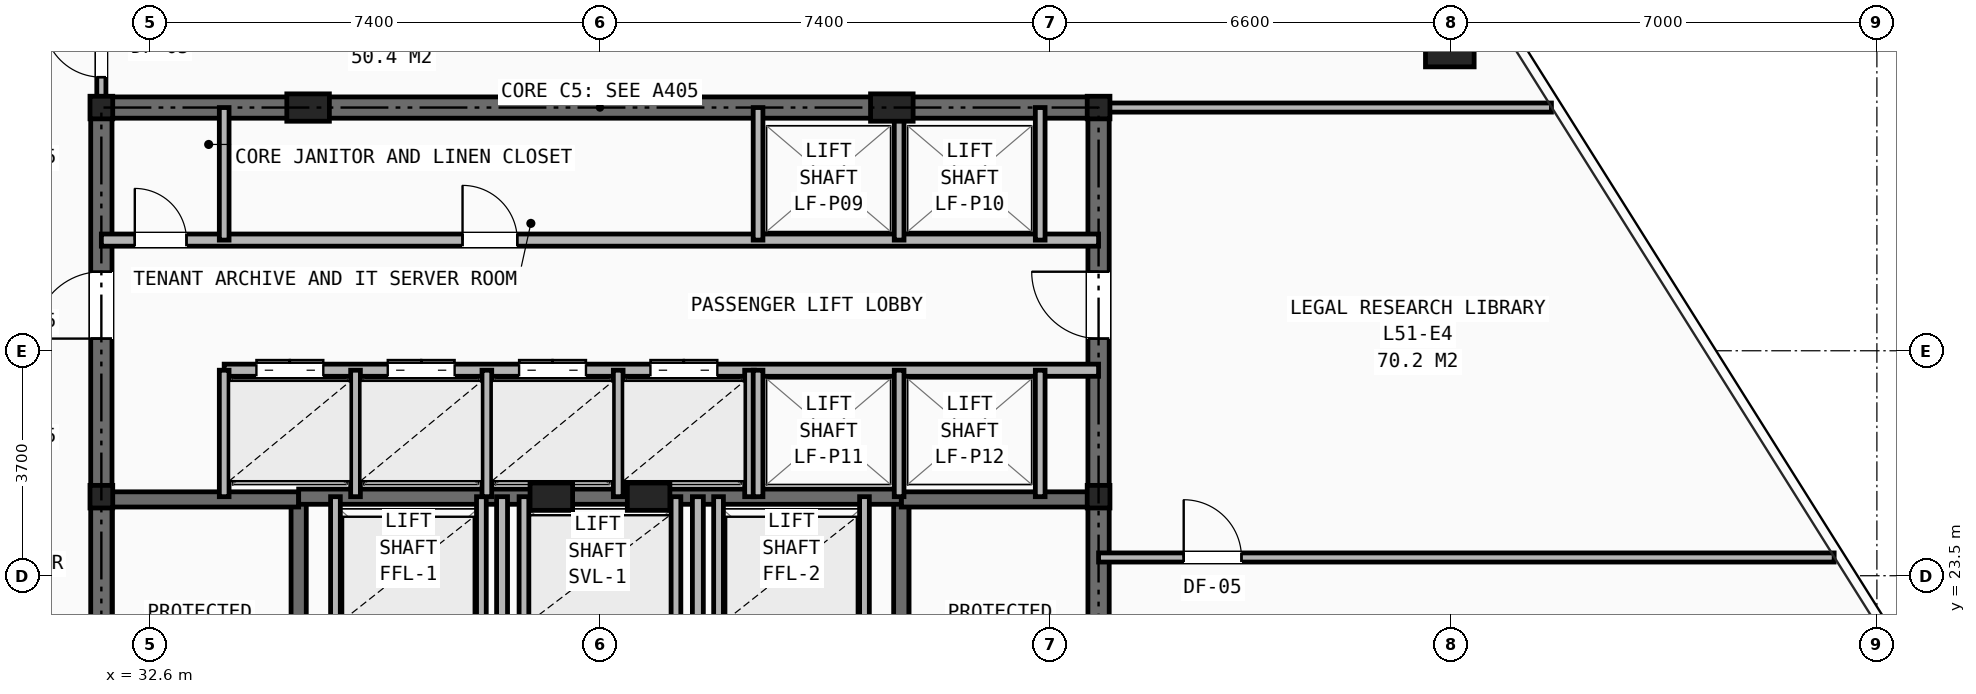
"""IFC4 building model, lengths in metres.
Left out: names, types, materials, properties, quantities, classifications, styles, units other than length and angle.
Written with IfcOpenShell. Run it as: python <this file> out.ifc"""

import sys

from ifc_helpers import new_model, si_unit, direction, frame, frame_2d, origin, origin_2d, place, context, subcontext, project, spatial, rectangle, hollow_rectangle, i_section, extrude, element, fill, save


model = new_model("IFC4")
c1 = context("Model", 3, precision=1e-05, world=origin(), true_north=direction((0.0, 1.0)))
c2 = subcontext(c1, "Body", "Model", "MODEL_VIEW")
j1 = project(units=[si_unit("LENGTHUNIT", "METRE"), si_unit("PLANEANGLEUNIT", "RADIAN")], contexts=[c1])
p1 = place(None, origin())
s1 = spatial("IfcSite", under=j1, at=p1, CompositionType="ELEMENT")
p2 = place(p1, origin())
s2 = spatial("IfcBuilding", under=s1, at=p2, CompositionType="ELEMENT")
p3 = place(p2, frame((0.0, 0.0, 179.25)))
s3 = spatial("IfcBuildingStorey", under=s2, at=p3, CompositionType="ELEMENT", Elevation=179.25)
for number, where, z_axis, x_axis in (
    (1, (31.8, 24.8, 0.0), (0.0, 0.0, 1.0), (1.0, 0.0, 0.0)),
    (2, (48.2, 24.8, 0.0), (0.0, 0.0, 1.0), (1.0, 0.0, 0.0)),
    (3, (31.8, 31.2, 0.0), (0.0, 0.0, 1.0), (1.0, 0.0, 0.0)),
    (4, (48.2, 31.2, 0.0), (0.0, 0.0, 1.0), (1.0, 0.0, 0.0)),
):
    element("IfcColumn", number, at=place(p3, frame(where, z_axis=z_axis, x_axis=x_axis)), inside=s3, PredefinedType="COLUMN", context=c2, shape_type="SweptSolid", body=[
        extrude(i_section(OverallWidth=0.374, OverallDepth=0.372, WebThickness=0.016, FlangeThickness=0.026, at=origin_2d()), origin(), (0.0, 0.0, 1.0), 3.45),
    ])
for number, where, z_axis, x_axis in (
    (5, (35.2, 31.2, 0.0), (0.0, 0.0, 1.0), (1.0, 0.0, 0.0)),
    (6, (44.8, 31.2, 0.0), (0.0, 0.0, 1.0), (1.0, 0.0, 0.0)),
    (7, (39.2, 24.8, 0.0), (0.0, 0.0, 1.0), (1.0, 0.0, 0.0)),
    (8, (40.8, 24.8, 0.0), (0.0, 0.0, 1.0), (1.0, 0.0, 0.0)),
):
    element("IfcColumn", number, at=place(p3, frame(where, z_axis=z_axis, x_axis=x_axis)), inside=s3, PredefinedType="PILASTER", context=c2, shape_type="SweptSolid", body=[
        extrude(rectangle(XDim=0.7, YDim=0.45, at=origin_2d()), origin(), (0.0, 0.0, 1.0), 3.45),
    ])
p4 = place(p3, frame((53.976, 32.269, 0.0), z_axis=(0.0, 0.0, 1.0), x_axis=(1.0, 0.0, 0.0)))
e9 = element("IfcColumn", 9, at=p4, inside=s3, PredefinedType="COLUMN", context=c2, shape_type="SweptSolid", body=[
    extrude(hollow_rectangle(XDim=0.8, YDim=0.8, WallThickness=0.055, at=origin_2d()), origin(), (0.0, 0.0, 1.0), 3.45),
])
p5 = place(p3, frame((31.8, 31.2, 0.0), z_axis=(0.0, 0.0, 1.0), x_axis=(1.0, 0.0, 0.0)))
e10 = element("IfcWall", 10, at=p5, inside=s3, PredefinedType="SHEAR", context=c2, shape_type="SweptSolid", body=[
    extrude(rectangle(XDim=16.4, YDim=0.35, at=frame_2d((8.2, 0.0))), origin(), (0.0, 0.0, 1.0), 3.21),
])
p6 = place(p3, frame((31.8, 16.4, 0.0), z_axis=(0.0, 0.0, 1.0), x_axis=(0.0, 1.0, 0.0)))
e11 = element("IfcWall", 11, at=p6, inside=s3, PredefinedType="SHEAR", context=c2, shape_type="SweptSolid", body=[
    extrude(rectangle(XDim=14.8, YDim=0.35, at=frame_2d((7.4, 0.0))), origin(), (0.0, 0.0, 1.0), 3.21),
])
p7 = place(p6, frame((11.0, 0.0, 0.0)))
e12 = element("IfcOpeningElement", 12, at=p7, cuts=e11, PredefinedType="OPENING", context=c2, shape_type="SweptSolid", body=[
    extrude(rectangle(XDim=1.1, YDim=2.15, at=frame_2d((0.55, 1.075))), frame((0.0, 0.185, 0.0), z_axis=(0.0, -1.0, 0.0), x_axis=(1.0, 0.0, 0.0)), (0.0, 0.0, 1.0), 0.37),
])
p8 = place(p3, frame((48.2, 16.4, 0.0), z_axis=(0.0, 0.0, 1.0), x_axis=(0.0, 1.0, 0.0)))
e13 = element("IfcWall", 13, at=p8, inside=s3, PredefinedType="SHEAR", context=c2, shape_type="SweptSolid", body=[
    extrude(rectangle(XDim=14.8, YDim=0.35, at=frame_2d((7.4, 0.0))), origin(), (0.0, 0.0, 1.0), 3.21),
])
p9 = place(p8, frame((11.0, 0.0, 0.0)))
e14 = element("IfcOpeningElement", 14, at=p9, cuts=e13, PredefinedType="OPENING", context=c2, shape_type="SweptSolid", body=[
    extrude(rectangle(XDim=1.1, YDim=2.15, at=frame_2d((0.55, 1.075))), frame((0.0, 0.185, 0.0), z_axis=(0.0, -1.0, 0.0), x_axis=(1.0, 0.0, 0.0)), (0.0, 0.0, 1.0), 0.37),
])
p10 = place(p3, frame((35.045, 16.4, 0.0), z_axis=(0.0, 0.0, 1.0), x_axis=(0.0, 1.0, 0.0)))
e15 = element("IfcWall", 15, at=p10, inside=s3, PredefinedType="SHEAR", context=c2, shape_type="SweptSolid", body=[
    extrude(rectangle(XDim=8.4, YDim=0.25, at=frame_2d((4.2, 0.0))), origin(), (0.0, 0.0, 1.0), 3.21),
])
p11 = place(p10, frame((0.45, 0.0, 0.0)))
e16 = element("IfcOpeningElement", 16, at=p11, cuts=e15, PredefinedType="OPENING", context=c2, shape_type="SweptSolid", body=[
    extrude(rectangle(XDim=0.95, YDim=2.1, at=frame_2d((0.475, 1.05))), frame((0.0, 0.135, 0.0), z_axis=(0.0, -1.0, 0.0), x_axis=(1.0, 0.0, 0.0)), (0.0, 0.0, 1.0), 0.27),
])
p12 = place(p3, frame((31.8, 24.755, 0.0), z_axis=(0.0, 0.0, 1.0), x_axis=(1.0, 0.0, 0.0)))
e17 = element("IfcWall", 17, at=p12, inside=s3, PredefinedType="SHEAR", context=c2, shape_type="SweptSolid", body=[
    extrude(rectangle(XDim=3.245, YDim=0.25, at=frame_2d((1.623, 0.0))), origin(), (0.0, 0.0, 1.0), 3.21),
])
p13 = place(p3, frame((44.955, 16.4, 0.0), z_axis=(0.0, 0.0, 1.0), x_axis=(0.0, 1.0, 0.0)))
e18 = element("IfcWall", 18, at=p13, inside=s3, PredefinedType="SHEAR", context=c2, shape_type="SweptSolid", body=[
    extrude(rectangle(XDim=8.4, YDim=0.25, at=frame_2d((4.2, 0.0))), origin(), (0.0, 0.0, 1.0), 3.21),
])
p14 = place(p13, frame((0.45, 0.0, 0.0)))
e19 = element("IfcOpeningElement", 19, at=p14, cuts=e18, PredefinedType="OPENING", context=c2, shape_type="SweptSolid", body=[
    extrude(rectangle(XDim=0.95, YDim=2.1, at=frame_2d((0.475, 1.05))), frame((0.0, 0.135, 0.0), z_axis=(0.0, -1.0, 0.0), x_axis=(1.0, 0.0, 0.0)), (0.0, 0.0, 1.0), 0.27),
])
p15 = place(p3, frame((44.955, 24.755, 0.0), z_axis=(0.0, 0.0, 1.0), x_axis=(1.0, 0.0, 0.0)))
e20 = element("IfcWall", 20, at=p15, inside=s3, PredefinedType="SHEAR", context=c2, shape_type="SweptSolid", body=[
    extrude(rectangle(XDim=3.245, YDim=0.25, at=frame_2d((1.623, 0.0))), origin(), (0.0, 0.0, 1.0), 3.21),
])
p16 = place(p3, frame((35.045, 24.8, 0.0), z_axis=(0.0, 0.0, 1.0), x_axis=(1.0, 0.0, 0.0)))
e21 = element("IfcWall", 21, at=p16, inside=s3, PredefinedType="SHEAR", context=c2, shape_type="SweptSolid", body=[
    extrude(rectangle(XDim=9.91, YDim=0.25, at=frame_2d((4.955, 0.0))), origin(), (0.0, 0.0, 1.0), 3.21),
])
p17 = place(p3, frame((38.39, 16.4, 0.0), z_axis=(0.0, 0.0, 1.0), x_axis=(0.0, 1.0, 0.0)))
e22 = element("IfcWall", 22, at=p17, inside=s3, PredefinedType="PARTITIONING", context=c2, shape_type="SweptSolid", body=[
    extrude(rectangle(XDim=8.4, YDim=0.18, at=frame_2d((4.2, 0.0))), origin(), (0.0, 0.0, 1.0), 2.665),
])
p18 = place(p17, frame((3.8, 0.0, 0.0)))
e23 = element("IfcOpeningElement", 23, at=p18, cuts=e22, PredefinedType="OPENING", context=c2, shape_type="SweptSolid", body=[
    extrude(rectangle(XDim=0.95, YDim=2.1, at=frame_2d((0.475, 1.05))), frame((0.0, 0.1, 0.0), z_axis=(0.0, -1.0, 0.0), x_axis=(1.0, 0.0, 0.0)), (0.0, 0.0, 1.0), 0.2),
])
p19 = place(p3, frame((41.61, 16.4, 0.0), z_axis=(0.0, 0.0, 1.0), x_axis=(0.0, 1.0, 0.0)))
e24 = element("IfcWall", 24, at=p19, inside=s3, PredefinedType="PARTITIONING", context=c2, shape_type="SweptSolid", body=[
    extrude(rectangle(XDim=8.4, YDim=0.18, at=frame_2d((4.2, 0.0))), origin(), (0.0, 0.0, 1.0), 2.665),
])
for number, where, z_axis, x_axis in (
    (25, (35.65, 22.48, 0.0), (0.0, 0.0, 1.0), (0.0, 1.0, 0.0)),
    (26, (38.05, 22.48, 0.0), (0.0, 0.0, 1.0), (0.0, 1.0, 0.0)),
    (27, (41.95, 22.48, 0.0), (0.0, 0.0, 1.0), (0.0, 1.0, 0.0)),
    (28, (44.35, 22.48, 0.0), (0.0, 0.0, 1.0), (0.0, 1.0, 0.0)),
    (29, (38.75, 22.48, 0.0), (0.0, 0.0, 1.0), (0.0, 1.0, 0.0)),
    (30, (41.25, 22.48, 0.0), (0.0, 0.0, 1.0), (0.0, 1.0, 0.0)),
):
    element("IfcWall", number, at=place(p3, frame(where, z_axis=z_axis, x_axis=x_axis)), inside=s3, PredefinedType="SOLIDWALL", context=c2, shape_type="SweptSolid", body=[
        extrude(rectangle(XDim=2.32, YDim=0.16, at=frame_2d((1.16, 0.0))), origin(), (0.0, 0.0, 1.0), 3.21),
    ])
p20 = place(p3, frame((31.8, 29.02, 0.0), z_axis=(0.0, 0.0, 1.0), x_axis=(1.0, 0.0, 0.0)))
e31 = element("IfcWall", 31, at=p20, inside=s3, PredefinedType="SOLIDWALL", context=c2, shape_type="SweptSolid", body=[
    extrude(rectangle(XDim=16.4, YDim=0.2, at=frame_2d((8.2, 0.0))), origin(), (0.0, 0.0, 1.0), 2.665),
])
p21 = place(p20, frame((0.55, 0.0, 0.0)))
e32 = element("IfcOpeningElement", 32, at=p21, cuts=e31, PredefinedType="OPENING", context=c2, shape_type="SweptSolid", body=[
    extrude(rectangle(XDim=0.85, YDim=2.05, at=frame_2d((0.425, 1.025))), frame((0.0, 0.11, 0.0), z_axis=(0.0, -1.0, 0.0), x_axis=(1.0, 0.0, 0.0)), (0.0, 0.0, 1.0), 0.22),
])
p22 = place(p20, frame((5.94, 0.0, 0.0)))
e33 = element("IfcOpeningElement", 33, at=p22, cuts=e31, PredefinedType="OPENING", context=c2, shape_type="SweptSolid", body=[
    extrude(rectangle(XDim=0.9, YDim=2.1, at=frame_2d((0.45, 1.05))), frame((0.0, 0.11, 0.0), z_axis=(0.0, -1.0, 0.0), x_axis=(1.0, 0.0, 0.0)), (0.0, 0.0, 1.0), 0.22),
])
p23 = place(p3, frame((33.82, 26.88, 0.0), z_axis=(0.0, 0.0, 1.0), x_axis=(1.0, 0.0, 0.0)))
e34 = element("IfcWall", 34, at=p23, inside=s3, PredefinedType="SOLIDWALL", context=c2, shape_type="SweptSolid", body=[
    extrude(rectangle(XDim=14.38, YDim=0.2, at=frame_2d((7.19, 0.0))), origin(), (0.0, 0.0, 1.0), 2.665),
])
p24 = place(p23, frame((0.53, 0.0, 0.0)))
e35 = element("IfcOpeningElement", 35, at=p24, cuts=e34, PredefinedType="OPENING", context=c2, shape_type="SweptSolid", body=[
    extrude(rectangle(XDim=1.1, YDim=2.15, at=frame_2d((0.55, 1.075))), frame((0.0, 0.11, 0.0), z_axis=(0.0, -1.0, 0.0), x_axis=(1.0, 0.0, 0.0)), (0.0, 0.0, 1.0), 0.22),
])
p25 = place(p23, frame((2.69, 0.0, 0.0)))
e36 = element("IfcOpeningElement", 36, at=p25, cuts=e34, PredefinedType="OPENING", context=c2, shape_type="SweptSolid", body=[
    extrude(rectangle(XDim=1.1, YDim=2.15, at=frame_2d((0.55, 1.075))), frame((0.0, 0.11, 0.0), z_axis=(0.0, -1.0, 0.0), x_axis=(1.0, 0.0, 0.0)), (0.0, 0.0, 1.0), 0.22),
])
p26 = place(p23, frame((4.85, 0.0, 0.0)))
e37 = element("IfcOpeningElement", 37, at=p26, cuts=e34, PredefinedType="OPENING", context=c2, shape_type="SweptSolid", body=[
    extrude(rectangle(XDim=1.1, YDim=2.15, at=frame_2d((0.55, 1.075))), frame((0.0, 0.11, 0.0), z_axis=(0.0, -1.0, 0.0), x_axis=(1.0, 0.0, 0.0)), (0.0, 0.0, 1.0), 0.22),
])
p27 = place(p23, frame((7.01, 0.0, 0.0)))
e38 = element("IfcOpeningElement", 38, at=p27, cuts=e34, PredefinedType="OPENING", context=c2, shape_type="SweptSolid", body=[
    extrude(rectangle(XDim=1.1, YDim=2.15, at=frame_2d((0.55, 1.075))), frame((0.0, 0.11, 0.0), z_axis=(0.0, -1.0, 0.0), x_axis=(1.0, 0.0, 0.0)), (0.0, 0.0, 1.0), 0.22),
])
p28 = place(p3, frame((33.82, 29.02, 0.0), z_axis=(0.0, 0.0, 1.0), x_axis=(0.0, 1.0, 0.0)))
e39 = element("IfcWall", 39, at=p28, inside=s3, PredefinedType="SOLIDWALL", context=c2, shape_type="SweptSolid", body=[
    extrude(rectangle(XDim=2.18, YDim=0.16, at=frame_2d((1.09, 0.0))), origin(), (0.0, 0.0, 1.0), 2.665),
])
for number, where, z_axis, x_axis in (
    (40, (33.82, 24.8, 0.0), (0.0, 0.0, 1.0), (0.0, 1.0, 0.0)),
    (41, (35.98, 24.8, 0.0), (0.0, 0.0, 1.0), (0.0, 1.0, 0.0)),
    (42, (38.14, 24.8, 0.0), (0.0, 0.0, 1.0), (0.0, 1.0, 0.0)),
    (43, (40.3, 24.8, 0.0), (0.0, 0.0, 1.0), (0.0, 1.0, 0.0)),
    (44, (42.46, 24.8, 0.0), (0.0, 0.0, 1.0), (0.0, 1.0, 0.0)),
):
    element("IfcWall", number, at=place(p3, frame(where, z_axis=z_axis, x_axis=x_axis)), inside=s3, PredefinedType="SOLIDWALL", context=c2, shape_type="SweptSolid", body=[
        extrude(rectangle(XDim=2.08, YDim=0.16, at=frame_2d((1.04, 0.0))), origin(), (0.0, 0.0, 1.0), 3.21),
    ])
for number, where, z_axis, x_axis in (
    (45, (42.6, 29.02, 0.0), (0.0, 0.0, 1.0), (0.0, 1.0, 0.0)),
    (46, (44.92, 29.02, 0.0), (0.0, 0.0, 1.0), (0.0, 1.0, 0.0)),
    (47, (47.24, 29.02, 0.0), (0.0, 0.0, 1.0), (0.0, 1.0, 0.0)),
):
    element("IfcWall", number, at=place(p3, frame(where, z_axis=z_axis, x_axis=x_axis)), inside=s3, PredefinedType="SOLIDWALL", context=c2, shape_type="SweptSolid", body=[
        extrude(rectangle(XDim=2.18, YDim=0.16, at=frame_2d((1.09, 0.0))), origin(), (0.0, 0.0, 1.0), 2.665),
    ])
for number, where, z_axis, x_axis in (
    (48, (42.6, 24.8, 0.0), (0.0, 0.0, 1.0), (0.0, 1.0, 0.0)),
    (49, (44.92, 24.8, 0.0), (0.0, 0.0, 1.0), (0.0, 1.0, 0.0)),
    (50, (47.24, 24.8, 0.0), (0.0, 0.0, 1.0), (0.0, 1.0, 0.0)),
):
    element("IfcWall", number, at=place(p3, frame(where, z_axis=z_axis, x_axis=x_axis)), inside=s3, PredefinedType="SOLIDWALL", context=c2, shape_type="SweptSolid", body=[
        extrude(rectangle(XDim=2.08, YDim=0.16, at=frame_2d((1.04, 0.0))), origin(), (0.0, 0.0, 1.0), 3.21),
    ])
p29 = place(p3, frame((31.8, 31.2, 0.0), z_axis=(0.0, 0.0, 1.0), x_axis=(0.0, 1.0, 0.0)))
e51 = element("IfcWall", 51, at=p29, inside=s3, PredefinedType="PARTITIONING", context=c2, shape_type="SweptSolid", body=[
    extrude(rectangle(XDim=5.3, YDim=0.15, at=frame_2d((2.65, 0.0))), origin(), (0.0, 0.0, 1.0), 2.225),
])
p30 = place(p29, frame((0.5, 0.0, 0.0)))
e52 = element("IfcOpeningElement", 52, at=p30, cuts=e51, PredefinedType="OPENING", context=c2, shape_type="SweptSolid", body=[
    extrude(rectangle(XDim=0.95, YDim=2.1, at=frame_2d((0.475, 1.05))), frame((0.0, 0.085, 0.0), z_axis=(0.0, -1.0, 0.0), x_axis=(1.0, 0.0, 0.0)), (0.0, 0.0, 1.0), 0.17),
])
p31 = place(p29, frame((2.9, 0.0, 0.0)))
e53 = element("IfcOpeningElement", 53, at=p31, cuts=e51, PredefinedType="OPENING", context=c2, shape_type="SweptSolid", body=[
    extrude(rectangle(XDim=0.95, YDim=2.1, at=frame_2d((0.475, 1.05))), frame((0.0, 0.085, 0.0), z_axis=(0.0, -1.0, 0.0), x_axis=(1.0, 0.0, 0.0)), (0.0, 0.0, 1.0), 0.17),
])
p32 = place(p3, frame((48.2, 31.2, 0.0), z_axis=(0.0, 0.0, 1.0), x_axis=(1.0, 0.0, 0.0)))
e54 = element("IfcWall", 54, at=p32, inside=s3, PredefinedType="PARTITIONING", context=c2, shape_type="SweptSolid", body=[
    extrude(rectangle(XDim=7.448, YDim=0.15, at=frame_2d((3.724, 0.0))), origin(), (0.0, 0.0, 1.0), 2.225),
])
p33 = place(p3, frame((48.2, 23.8, 0.0), z_axis=(0.0, 0.0, 1.0), x_axis=(1.0, 0.0, 0.0)))
e55 = element("IfcWall", 55, at=p33, inside=s3, PredefinedType="PARTITIONING", context=c2, shape_type="SweptSolid", body=[
    extrude(rectangle(XDim=12.097, YDim=0.15, at=frame_2d((6.049, 0.0))), origin(), (0.0, 0.0, 1.0), 2.589),
])
p34 = place(p33, frame((1.4, 0.0, 0.0)))
e56 = element("IfcOpeningElement", 56, at=p34, cuts=e55, PredefinedType="OPENING", context=c2, shape_type="SweptSolid", body=[
    extrude(rectangle(XDim=0.95, YDim=2.1, at=frame_2d((0.475, 1.05))), frame((0.0, 0.085, 0.0), z_axis=(0.0, -1.0, 0.0), x_axis=(1.0, 0.0, 0.0)), (0.0, 0.0, 1.0), 0.17),
])
p35 = place(p21, origin())
e57 = element("IfcDoor", 57, at=p35, inside=s3, OperationType="SINGLE_SWING_LEFT", PredefinedType="DOOR", context=c2, shape_type="SweptSolid", body=[
    extrude(rectangle(XDim=0.85, YDim=2.05, at=frame_2d((0.425, 1.025))), frame((0.0, 0.025, 0.0), z_axis=(0.0, -1.0, 0.0), x_axis=(1.0, 0.0, 0.0)), (0.0, 0.0, 1.0), 0.05),
])
fill(e32, e57)
p36 = place(p7, origin())
e58 = element("IfcDoor", 58, at=p36, inside=s3, OperationType="SINGLE_SWING_LEFT", PredefinedType="DOOR", context=c2, shape_type="SweptSolid", body=[
    extrude(rectangle(XDim=1.1, YDim=2.15, at=frame_2d((0.55, 1.075))), frame((0.0, 0.025, 0.0), z_axis=(0.0, -1.0, 0.0), x_axis=(1.0, 0.0, 0.0)), (0.0, 0.0, 1.0), 0.05),
])
fill(e12, e58)
p37 = place(p9, origin())
e59 = element("IfcDoor", 59, at=p37, inside=s3, OperationType="SINGLE_SWING_RIGHT", PredefinedType="DOOR", context=c2, shape_type="SweptSolid", body=[
    extrude(rectangle(XDim=1.1, YDim=2.15, at=frame_2d((0.55, 1.075))), frame((0.0, 0.025, 0.0), z_axis=(0.0, -1.0, 0.0), x_axis=(1.0, 0.0, 0.0)), (0.0, 0.0, 1.0), 0.05),
])
fill(e14, e59)
p38 = place(p22, origin())
e60 = element("IfcDoor", 60, at=p38, inside=s3, OperationType="SINGLE_SWING_LEFT", PredefinedType="DOOR", context=c2, shape_type="SweptSolid", body=[
    extrude(rectangle(XDim=0.9, YDim=2.1, at=frame_2d((0.45, 1.05))), frame((0.0, 0.025, 0.0), z_axis=(0.0, -1.0, 0.0), x_axis=(1.0, 0.0, 0.0)), (0.0, 0.0, 1.0), 0.05),
])
fill(e33, e60)
p39 = place(p24, origin())
e61 = element("IfcDoor", 61, at=p39, inside=s3, OperationType="DOUBLE_DOOR_SLIDING", PredefinedType="DOOR", context=c2, shape_type="SweptSolid", body=[
    extrude(rectangle(XDim=1.1, YDim=2.15, at=frame_2d((0.55, 1.075))), frame((0.0, 0.025, 0.0), z_axis=(0.0, -1.0, 0.0), x_axis=(1.0, 0.0, 0.0)), (0.0, 0.0, 1.0), 0.05),
])
fill(e35, e61)
p40 = place(p25, origin())
e62 = element("IfcDoor", 62, at=p40, inside=s3, OperationType="DOUBLE_DOOR_SLIDING", PredefinedType="DOOR", context=c2, shape_type="SweptSolid", body=[
    extrude(rectangle(XDim=1.1, YDim=2.15, at=frame_2d((0.55, 1.075))), frame((0.0, 0.025, 0.0), z_axis=(0.0, -1.0, 0.0), x_axis=(1.0, 0.0, 0.0)), (0.0, 0.0, 1.0), 0.05),
])
fill(e36, e62)
p41 = place(p26, origin())
e63 = element("IfcDoor", 63, at=p41, inside=s3, OperationType="DOUBLE_DOOR_SLIDING", PredefinedType="DOOR", context=c2, shape_type="SweptSolid", body=[
    extrude(rectangle(XDim=1.1, YDim=2.15, at=frame_2d((0.55, 1.075))), frame((0.0, 0.025, 0.0), z_axis=(0.0, -1.0, 0.0), x_axis=(1.0, 0.0, 0.0)), (0.0, 0.0, 1.0), 0.05),
])
fill(e37, e63)
p42 = place(p27, origin())
e64 = element("IfcDoor", 64, at=p42, inside=s3, OperationType="DOUBLE_DOOR_SLIDING", PredefinedType="DOOR", context=c2, shape_type="SweptSolid", body=[
    extrude(rectangle(XDim=1.1, YDim=2.15, at=frame_2d((0.55, 1.075))), frame((0.0, 0.025, 0.0), z_axis=(0.0, -1.0, 0.0), x_axis=(1.0, 0.0, 0.0)), (0.0, 0.0, 1.0), 0.05),
])
fill(e38, e64)
p43 = place(p30, origin())
e65 = element("IfcDoor", 65, at=p43, inside=s3, OperationType="SINGLE_SWING_RIGHT", PredefinedType="DOOR", context=c2, shape_type="SweptSolid", body=[
    extrude(rectangle(XDim=0.95, YDim=2.1, at=frame_2d((0.475, 1.05))), frame((0.0, 0.025, 0.0), z_axis=(0.0, -1.0, 0.0), x_axis=(1.0, 0.0, 0.0)), (0.0, 0.0, 1.0), 0.05),
])
fill(e52, e65)
p44 = place(p34, origin())
e66 = element("IfcDoor", 66, at=p44, inside=s3, OperationType="SINGLE_SWING_LEFT", PredefinedType="DOOR", context=c2, shape_type="SweptSolid", body=[
    extrude(rectangle(XDim=0.95, YDim=2.1, at=frame_2d((0.475, 1.05))), frame((0.0, 0.025, 0.0), z_axis=(0.0, -1.0, 0.0), x_axis=(1.0, 0.0, 0.0)), (0.0, 0.0, 1.0), 0.05),
])
fill(e56, e66)
save(model, sys.argv[1])
